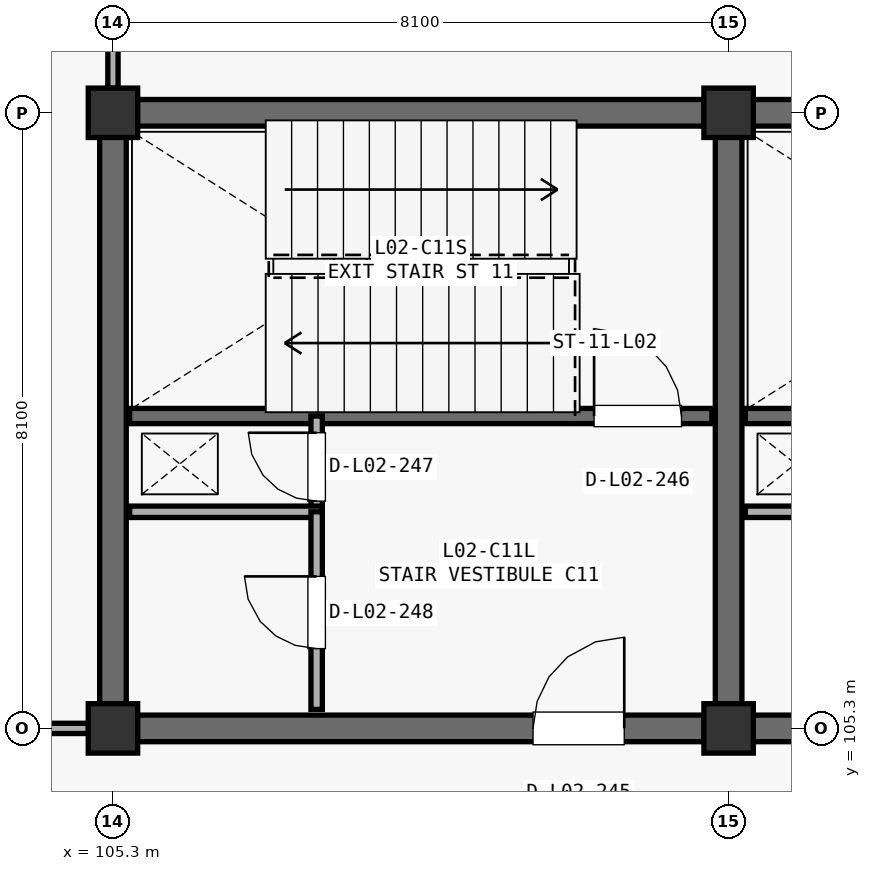
"""IFC4 building model, lengths in metres.
Left out: names, types, materials, properties, quantities, classifications, styles, units other than length and angle.
Written with IfcOpenShell. Run it as: python <this file> out.ifc"""

import sys

from ifc_helpers import new_model, si_unit, direction, frame, frame_2d, origin, origin_2d, place, context, subcontext, project, spatial, rectangle, extrude, element, fill, save


model = new_model("IFC4")
c1 = context("Model", 3, precision=1e-05, world=origin(), true_north=direction((0.0, 1.0)))
c2 = subcontext(c1, "Body", "Model", "MODEL_VIEW")
j1 = project(units=[si_unit("LENGTHUNIT", "METRE"), si_unit("PLANEANGLEUNIT", "RADIAN")], contexts=[c1])
p1 = place(None, origin())
s1 = spatial("IfcSite", under=j1, at=p1, CompositionType="ELEMENT")
p2 = place(p1, origin())
s2 = spatial("IfcBuilding", under=s1, at=p2, CompositionType="ELEMENT")
p3 = place(p2, frame((0.0, 0.0, 9.69)))
s3 = spatial("IfcBuildingStorey", under=s2, at=p3, CompositionType="ELEMENT", Elevation=9.69)
for number, where, z_axis, x_axis in (
    (1, (105.3, 105.3, 0.0), (0.0, 0.0, 1.0), (1.0, 0.0, 0.0)),
    (2, (105.3, 113.4, 0.0), (0.0, 0.0, 1.0), (1.0, 0.0, 0.0)),
    (3, (113.4, 105.3, 0.0), (0.0, 0.0, 1.0), (1.0, 0.0, 0.0)),
    (4, (113.4, 113.4, 0.0), (0.0, 0.0, 1.0), (1.0, 0.0, 0.0)),
):
    element("IfcColumn", number, at=place(p3, frame(where, z_axis=z_axis, x_axis=x_axis)), inside=s3, PredefinedType="COLUMN", context=c2, shape_type="SweptSolid", body=[
        extrude(rectangle(XDim=0.65, YDim=0.65, at=origin_2d()), origin(), (0.0, 0.0, 1.0), 4.42),
    ])
p4 = place(p3, frame((113.723, 113.4, 0.0), z_axis=(0.0, 0.0, 1.0), x_axis=(1.0, 0.0, 0.0)))
e5 = element("IfcWall", 5, at=p4, inside=s3, PredefinedType="SHEAR", context=c2, shape_type="SweptSolid", body=[
    extrude(rectangle(XDim=7.454, YDim=0.35, at=frame_2d((3.727, 0.0))), origin(), (0.0, 0.0, 1.0), 4.142),
])
p5 = place(p3, frame((113.4, 105.623, 0.0), z_axis=(0.0, 0.0, 1.0), x_axis=(0.0, 1.0, 0.0)))
e6 = element("IfcWall", 6, at=p5, inside=s3, PredefinedType="SHEAR", context=c2, shape_type="SweptSolid", body=[
    extrude(rectangle(XDim=7.454, YDim=0.35, at=frame_2d((3.727, 0.0))), origin(), (0.0, 0.0, 1.0), 4.142),
])
p6 = place(p3, frame((113.723, 105.3, 0.0), z_axis=(0.0, 0.0, 1.0), x_axis=(1.0, 0.0, 0.0)))
e7 = element("IfcWall", 7, at=p6, inside=s3, PredefinedType="SHEAR", context=c2, shape_type="SweptSolid", body=[
    extrude(rectangle(XDim=7.454, YDim=0.35, at=frame_2d((3.727, 0.0))), origin(), (0.0, 0.0, 1.0), 4.142),
])
p7 = place(p6, frame((5.204, 0.0, 0.0)))
e8 = element("IfcOpeningElement", 8, at=p7, cuts=e7, PredefinedType="OPENING", context=c2, shape_type="SweptSolid", body=[
    extrude(rectangle(XDim=1.2, YDim=2.2, at=frame_2d((0.6, 1.1))), frame((0.0, 0.185, 0.0), z_axis=(0.0, -1.0, 0.0), x_axis=(1.0, 0.0, 0.0)), (0.0, 0.0, 1.0), 0.37),
])
p8 = place(p3, frame((113.62, 109.41, 0.0), z_axis=(0.0, 0.0, 1.0), x_axis=(1.0, 0.0, 0.0)))
e9 = element("IfcWall", 9, at=p8, inside=s3, PredefinedType="SHEAR", context=c2, shape_type="SweptSolid", body=[
    extrude(rectangle(XDim=7.66, YDim=0.2, at=frame_2d((3.83, 0.0))), origin(), (0.0, 0.0, 1.0), 4.142),
])
p9 = place(p8, frame((6.11, 0.0, 0.0)))
e10 = element("IfcOpeningElement", 10, at=p9, cuts=e9, PredefinedType="OPENING", context=c2, shape_type="SweptSolid", body=[
    extrude(rectangle(XDim=1.15, YDim=2.2, at=frame_2d((0.575, 1.1))), frame((0.0, 0.11, 0.0), z_axis=(0.0, -1.0, 0.0), x_axis=(1.0, 0.0, 0.0)), (0.0, 0.0, 1.0), 0.22),
])
p10 = place(p3, frame((113.62, 108.15, 0.0), z_axis=(0.0, 0.0, 1.0), x_axis=(1.0, 0.0, 0.0)))
e11 = element("IfcWall", 11, at=p10, inside=s3, PredefinedType="PARTITIONING", context=c2, shape_type="SweptSolid", body=[
    extrude(rectangle(XDim=2.53, YDim=0.15, at=frame_2d((1.265, 0.0))), origin(), (0.0, 0.0, 1.0), 4.142),
])
for number, where, z_axis, x_axis in (
    (12, (105.623, 113.4, 0.0), (0.0, 0.0, 1.0), (1.0, 0.0, 0.0)),
    (13, (105.3, 105.623, 0.0), (0.0, 0.0, 1.0), (0.0, 1.0, 0.0)),
):
    element("IfcWall", number, at=place(p3, frame(where, z_axis=z_axis, x_axis=x_axis)), inside=s3, PredefinedType="SHEAR", context=c2, shape_type="SweptSolid", body=[
        extrude(rectangle(XDim=7.454, YDim=0.35, at=frame_2d((3.727, 0.0))), origin(), (0.0, 0.0, 1.0), 4.142),
    ])
p11 = place(p3, frame((105.623, 105.3, 0.0), z_axis=(0.0, 0.0, 1.0), x_axis=(1.0, 0.0, 0.0)))
e14 = element("IfcWall", 14, at=p11, inside=s3, PredefinedType="SHEAR", context=c2, shape_type="SweptSolid", body=[
    extrude(rectangle(XDim=7.454, YDim=0.35, at=frame_2d((3.727, 0.0))), origin(), (0.0, 0.0, 1.0), 4.142),
])
p12 = place(p11, frame((5.204, 0.0, 0.0)))
e15 = element("IfcOpeningElement", 15, at=p12, cuts=e14, PredefinedType="OPENING", context=c2, shape_type="SweptSolid", body=[
    extrude(rectangle(XDim=1.2, YDim=2.2, at=frame_2d((0.6, 1.1))), frame((0.0, 0.185, 0.0), z_axis=(0.0, -1.0, 0.0), x_axis=(1.0, 0.0, 0.0)), (0.0, 0.0, 1.0), 0.37),
])
p13 = place(p3, frame((105.52, 109.41, 0.0), z_axis=(0.0, 0.0, 1.0), x_axis=(1.0, 0.0, 0.0)))
e16 = element("IfcWall", 16, at=p13, inside=s3, PredefinedType="SHEAR", context=c2, shape_type="SweptSolid", body=[
    extrude(rectangle(XDim=7.66, YDim=0.2, at=frame_2d((3.83, 0.0))), origin(), (0.0, 0.0, 1.0), 4.142),
])
p14 = place(p13, frame((6.11, 0.0, 0.0)))
e17 = element("IfcOpeningElement", 17, at=p14, cuts=e16, PredefinedType="OPENING", context=c2, shape_type="SweptSolid", body=[
    extrude(rectangle(XDim=1.15, YDim=2.2, at=frame_2d((0.575, 1.1))), frame((0.0, 0.11, 0.0), z_axis=(0.0, -1.0, 0.0), x_axis=(1.0, 0.0, 0.0)), (0.0, 0.0, 1.0), 0.22),
])
p15 = place(p3, frame((107.98, 108.15, 0.0), z_axis=(0.0, 0.0, 1.0), x_axis=(0.0, 1.0, 0.0)))
e18 = element("IfcWall", 18, at=p15, inside=s3, PredefinedType="PARTITIONING", context=c2, shape_type="SweptSolid", body=[
    extrude(rectangle(XDim=1.26, YDim=0.15, at=frame_2d((0.63, 0.0))), origin(), (0.0, 0.0, 1.0), 4.142),
])
p16 = place(p15, frame((0.14, 0.0, 0.0)))
e19 = element("IfcOpeningElement", 19, at=p16, cuts=e18, PredefinedType="OPENING", context=c2, shape_type="SweptSolid", body=[
    extrude(rectangle(XDim=0.9, YDim=2.15, at=frame_2d((0.45, 1.075))), frame((0.0, 0.085, 0.0), z_axis=(0.0, -1.0, 0.0), x_axis=(1.0, 0.0, 0.0)), (0.0, 0.0, 1.0), 0.17),
])
p17 = place(p3, frame((105.52, 108.15, 0.0), z_axis=(0.0, 0.0, 1.0), x_axis=(1.0, 0.0, 0.0)))
e20 = element("IfcWall", 20, at=p17, inside=s3, PredefinedType="PARTITIONING", context=c2, shape_type="SweptSolid", body=[
    extrude(rectangle(XDim=2.53, YDim=0.15, at=frame_2d((1.265, 0.0))), origin(), (0.0, 0.0, 1.0), 4.142),
])
p18 = place(p3, frame((107.98, 105.55, 0.0), z_axis=(0.0, 0.0, 1.0), x_axis=(0.0, 1.0, 0.0)))
e21 = element("IfcWall", 21, at=p18, inside=s3, PredefinedType="PARTITIONING", context=c2, shape_type="SweptSolid", body=[
    extrude(rectangle(XDim=2.6, YDim=0.15, at=frame_2d((1.3, 0.0))), origin(), (0.0, 0.0, 1.0), 4.142),
])
p19 = place(p18, frame((0.8, 0.0, 0.0)))
e22 = element("IfcOpeningElement", 22, at=p19, cuts=e21, PredefinedType="OPENING", context=c2, shape_type="SweptSolid", body=[
    extrude(rectangle(XDim=0.95, YDim=2.15, at=frame_2d((0.475, 1.075))), frame((0.0, 0.085, 0.0), z_axis=(0.0, -1.0, 0.0), x_axis=(1.0, 0.0, 0.0)), (0.0, 0.0, 1.0), 0.17),
])
p20 = place(p3, frame((97.523, 105.3, 0.0), z_axis=(0.0, 0.0, 1.0), x_axis=(1.0, 0.0, 0.0)))
e23 = element("IfcWall", 23, at=p20, inside=s3, PredefinedType="PARTITIONING", context=c2, shape_type="SweptSolid", body=[
    extrude(rectangle(XDim=7.454, YDim=0.135, at=frame_2d((3.727, 0.0))), origin(), (0.0, 0.0, 1.0), 3.292),
])
p21 = place(p3, frame((105.3, 113.723, 0.0), z_axis=(0.0, 0.0, 1.0), x_axis=(0.0, 1.0, 0.0)))
e24 = element("IfcWall", 24, at=p21, inside=s3, PredefinedType="PARTITIONING", context=c2, shape_type="SweptSolid", body=[
    extrude(rectangle(XDim=7.454, YDim=0.135, at=frame_2d((3.727, 0.0))), origin(), (0.0, 0.0, 1.0), 3.292),
])
p22 = place(p21, frame((3.247, 0.0, 0.0)))
e25 = element("IfcOpeningElement", 25, at=p22, cuts=e24, PredefinedType="OPENING", context=c2, shape_type="SweptSolid", body=[
    extrude(rectangle(XDim=0.96, YDim=2.15, at=frame_2d((0.48, 1.075))), frame((0.0, 0.078, 0.0), z_axis=(0.0, -1.0, 0.0), x_axis=(1.0, 0.0, 0.0)), (0.0, 0.0, 1.0), 0.155),
])
p23 = place(p12, origin())
e26 = element("IfcDoor", 26, at=p23, inside=s3, OperationType="SINGLE_SWING_RIGHT", PredefinedType="DOOR", context=c2, shape_type="SweptSolid", body=[
    extrude(rectangle(XDim=1.2, YDim=2.2, at=frame_2d((0.6, 1.1))), frame((0.0, 0.025, 0.0), z_axis=(0.0, -1.0, 0.0), x_axis=(1.0, 0.0, 0.0)), (0.0, 0.0, 1.0), 0.05),
])
fill(e15, e26)
p24 = place(p14, origin())
e27 = element("IfcDoor", 27, at=p24, inside=s3, OperationType="SINGLE_SWING_LEFT", PredefinedType="DOOR", context=c2, shape_type="SweptSolid", body=[
    extrude(rectangle(XDim=1.15, YDim=2.2, at=frame_2d((0.575, 1.1))), frame((0.0, 0.025, 0.0), z_axis=(0.0, -1.0, 0.0), x_axis=(1.0, 0.0, 0.0)), (0.0, 0.0, 1.0), 0.05),
])
fill(e17, e27)
p25 = place(p16, origin())
e28 = element("IfcDoor", 28, at=p25, inside=s3, OperationType="SINGLE_SWING_RIGHT", PredefinedType="DOOR", context=c2, shape_type="SweptSolid", body=[
    extrude(rectangle(XDim=0.9, YDim=2.15, at=frame_2d((0.45, 1.075))), frame((0.0, 0.025, 0.0), z_axis=(0.0, -1.0, 0.0), x_axis=(1.0, 0.0, 0.0)), (0.0, 0.0, 1.0), 0.05),
])
fill(e19, e28)
p26 = place(p19, origin())
e29 = element("IfcDoor", 29, at=p26, inside=s3, OperationType="SINGLE_SWING_RIGHT", PredefinedType="DOOR", context=c2, shape_type="SweptSolid", body=[
    extrude(rectangle(XDim=0.95, YDim=2.15, at=frame_2d((0.475, 1.075))), frame((0.0, 0.025, 0.0), z_axis=(0.0, -1.0, 0.0), x_axis=(1.0, 0.0, 0.0)), (0.0, 0.0, 1.0), 0.05),
])
fill(e22, e29)
save(model, sys.argv[1])
